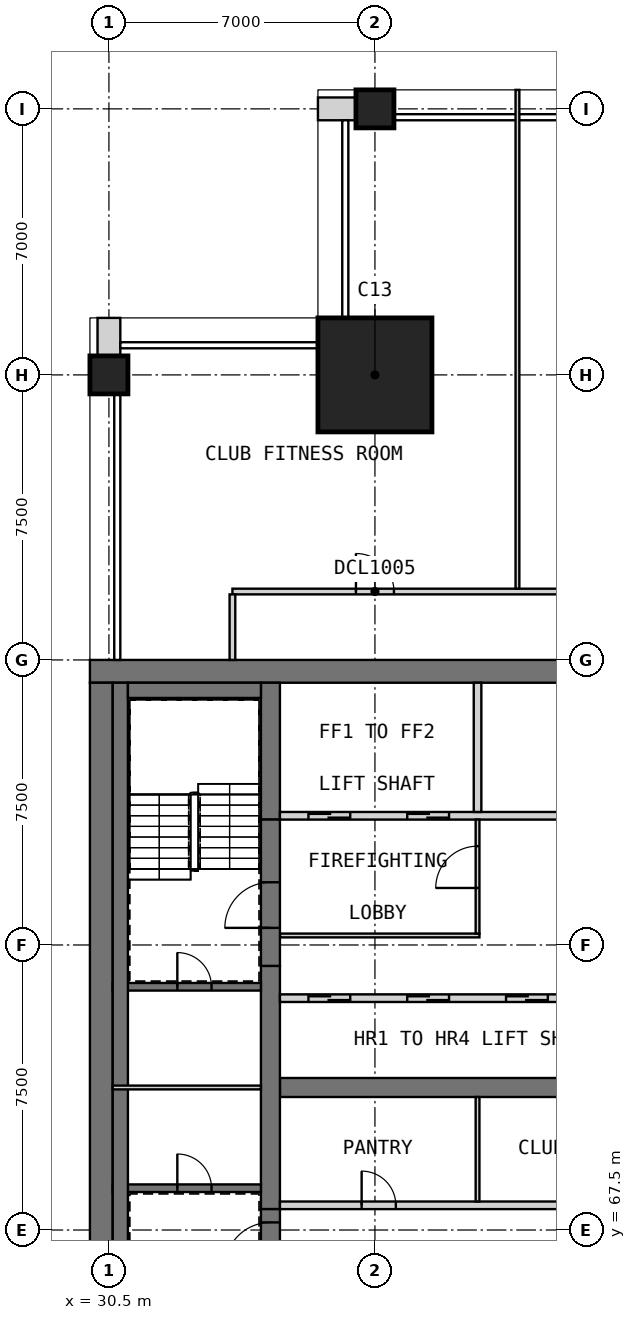
"""IFC4 building model, lengths in metres.
Left out: names, types, materials, properties, quantities, classifications, styles, units other than length and angle.
Written with IfcOpenShell. Run it as: python <this file> out.ifc"""

import sys

from ifc_helpers import new_model, si_unit, direction, frame, frame_2d, origin, origin_2d, place, context, subcontext, project, spatial, rectangle, extrude, element, fill, save


model = new_model("IFC4")
c1 = context("Model", 3, precision=1e-05, world=origin(), true_north=direction((0.0, 1.0)))
c2 = subcontext(c1, "Body", "Model", "MODEL_VIEW")
j1 = project(units=[si_unit("LENGTHUNIT", "METRE"), si_unit("PLANEANGLEUNIT", "RADIAN")], contexts=[c1])
p1 = place(None, origin())
s1 = spatial("IfcSite", under=j1, at=p1, CompositionType="ELEMENT")
p2 = place(p1, origin())
s2 = spatial("IfcBuilding", under=s1, at=p2, CompositionType="ELEMENT")
p3 = place(p2, frame((0.0, 0.0, 287.2)))
s3 = spatial("IfcBuildingStorey", under=s2, at=p3, CompositionType="ELEMENT", Elevation=287.2)
for number, where, z_axis, x_axis in (
    (1, (30.5, 90.0, 0.0), (0.0, 0.0, 1.0), (1.0, 0.0, 0.0)),
    (2, (37.5, 97.0, 0.0), (0.0, 0.0, 1.0), (1.0, 0.0, 0.0)),
):
    element("IfcColumn", number, at=place(p3, frame(where, z_axis=z_axis, x_axis=x_axis)), inside=s3, PredefinedType="COLUMN", context=c2, shape_type="SweptSolid", body=[
        extrude(rectangle(XDim=1.0, YDim=1.0, at=origin_2d()), origin(), (0.0, 0.0, 1.0), 5.0),
    ])
p4 = place(p3, frame((37.5, 90.0, 0.0), z_axis=(0.0, 0.0, 1.0), x_axis=(1.0, 0.0, 0.0)))
e3 = element("IfcColumn", 3, at=p4, inside=s3, PredefinedType="COLUMN", context=c2, shape_type="SweptSolid", body=[
    extrude(rectangle(XDim=3.0, YDim=3.0, at=origin_2d()), origin(), (0.0, 0.0, 1.0), 5.0),
])
p5 = place(p3, frame((30.0, 82.2, 0.0), z_axis=(0.0, 0.0, 1.0), x_axis=(1.0, 0.0, 0.0)))
e4 = element("IfcWall", 4, at=p5, inside=s3, PredefinedType="SHEAR", context=c2, shape_type="SweptSolid", body=[
    extrude(rectangle(XDim=30.0, YDim=0.6, at=frame_2d((15.0, 0.0))), origin(), (0.0, 0.0, 1.0), 5.0),
])
p6 = place(p3, frame((30.3, 60.6, 0.0), z_axis=(0.0, 0.0, 1.0), x_axis=(0.0, 1.0, 0.0)))
e5 = element("IfcWall", 5, at=p6, inside=s3, PredefinedType="SHEAR", context=c2, shape_type="SweptSolid", body=[
    extrude(rectangle(XDim=21.3, YDim=0.6, at=frame_2d((10.65, 0.0))), origin(), (0.0, 0.0, 1.0), 5.0),
])
p7 = place(p3, frame((35.0, 71.25, 0.0), z_axis=(0.0, 0.0, 1.0), x_axis=(1.0, 0.0, 0.0)))
e6 = element("IfcWall", 6, at=p7, inside=s3, PredefinedType="SHEAR", context=c2, shape_type="SweptSolid", body=[
    extrude(rectangle(XDim=15.6, YDim=0.5, at=frame_2d((7.8, 0.0))), origin(), (0.0, 0.0, 1.0), 5.0),
])
p8 = place(p3, frame((34.75, 68.05, 0.0), z_axis=(0.0, 0.0, 1.0), x_axis=(0.0, 1.0, 0.0)))
e7 = element("IfcWall", 7, at=p8, inside=s3, PredefinedType="SHEAR", context=c2, shape_type="SweptSolid", body=[
    extrude(rectangle(XDim=6.4, YDim=0.5, at=frame_2d((3.2, 0.0))), origin(), (0.0, 0.0, 1.0), 5.0),
])
p9 = place(p3, frame((34.75, 78.3, 0.0), z_axis=(0.0, 0.0, 1.0), x_axis=(0.0, 1.0, 0.0)))
e8 = element("IfcWall", 8, at=p9, inside=s3, PredefinedType="SHEAR", context=c2, shape_type="SweptSolid", body=[
    extrude(rectangle(XDim=3.6, YDim=0.5, at=frame_2d((1.8, 0.0))), origin(), (0.0, 0.0, 1.0), 5.0),
])
p10 = place(p2, frame((0.0, 0.0, 34.0)))
s4 = spatial("IfcBuildingStorey", under=s2, at=p10, CompositionType="ELEMENT", Elevation=34.0)
for number, where, z_axis, x_axis in (
    (9, (29.7, 70.8, 0.0), (0.0, 0.0, 1.0), (0.0, 1.0, 0.0)),
    (10, (29.7, 75.675, 0.0), (0.0, 0.0, 1.0), (0.0, 1.0, 0.0)),
    (11, (29.7, 80.55, 0.0), (0.0, 0.0, 1.0), (0.0, 1.0, 0.0)),
):
    element("IfcWall", number, at=place(p10, frame(where, z_axis=z_axis, x_axis=x_axis)), inside=s4, PredefinedType="SOLIDWALL", context=c2, shape_type="SweptSolid", body=[
        extrude(rectangle(XDim=0.9, YDim=0.6, at=frame_2d((0.45, 0.0))), origin(), (0.0, 0.0, 1.0), 286.2),
    ])
for number, where, z_axis, x_axis in (
    (12, (37.0, 97.0, 0.0), (0.0, 0.0, 1.0), (-1.0, 0.0, 0.0)),
    (13, (30.5, 91.5, 0.0), (0.0, 0.0, 1.0), (0.0, -1.0, 0.0)),
):
    element("IfcWall", number, at=place(p3, frame(where, z_axis=z_axis, x_axis=x_axis)), inside=s3, PredefinedType="SOLIDWALL", context=c2, shape_type="SweptSolid", body=[
        extrude(rectangle(XDim=1.0, YDim=0.6, at=frame_2d((0.5, 0.0))), origin(), (0.0, 0.0, 1.0), 4.7),
    ])
p11 = place(p3, frame((35.0, 68.15, 0.0), z_axis=(0.0, 0.0, 1.0), x_axis=(1.0, 0.0, 0.0)))
e14 = element("IfcWall", 14, at=p11, inside=s3, PredefinedType="PARTITIONING", context=c2, shape_type="SweptSolid", body=[
    extrude(rectangle(XDim=15.6, YDim=0.2, at=frame_2d((7.8, 0.0))), origin(), (0.0, 0.0, 1.0), 4.7),
])
p12 = place(p11, frame((2.15, 0.0, 0.0)))
e15 = element("IfcOpeningElement", 15, at=p12, cuts=e14, PredefinedType="OPENING", context=c2, shape_type="SweptSolid", body=[
    extrude(rectangle(XDim=0.9, YDim=2.1, at=frame_2d((0.45, 1.05))), frame((0.0, 0.11, 0.0), z_axis=(0.0, -1.0, 0.0), x_axis=(1.0, 0.0, 0.0)), (0.0, 0.0, 1.0), 0.22),
])
p13 = place(p11, frame((7.35, 0.0, 0.0)))
e16 = element("IfcOpeningElement", 16, at=p13, cuts=e14, PredefinedType="OPENING", context=c2, shape_type="SweptSolid", body=[
    extrude(rectangle(XDim=0.9, YDim=2.1, at=frame_2d((0.45, 1.05))), frame((0.0, 0.11, 0.0), z_axis=(0.0, -1.0, 0.0), x_axis=(1.0, 0.0, 0.0)), (0.0, 0.0, 1.0), 0.22),
])
p14 = place(p11, frame((12.55, 0.0, 0.0)))
e17 = element("IfcOpeningElement", 17, at=p14, cuts=e14, PredefinedType="OPENING", context=c2, shape_type="SweptSolid", body=[
    extrude(rectangle(XDim=0.9, YDim=2.1, at=frame_2d((0.45, 1.05))), frame((0.0, 0.11, 0.0), z_axis=(0.0, -1.0, 0.0), x_axis=(1.0, 0.0, 0.0)), (0.0, 0.0, 1.0), 0.22),
])
p15 = place(p3, frame((40.2, 68.25, 0.0), z_axis=(0.0, 0.0, 1.0), x_axis=(0.0, 1.0, 0.0)))
e18 = element("IfcWall", 18, at=p15, inside=s3, PredefinedType="PARTITIONING", context=c2, shape_type="SweptSolid", body=[
    extrude(rectangle(XDim=2.75, YDim=0.1, at=frame_2d((1.375, 0.0))), origin(), (0.0, 0.0, 1.0), 4.7),
])
p16 = place(p3, frame((35.0, 73.6, 0.0), z_axis=(0.0, 0.0, 1.0), x_axis=(1.0, 0.0, 0.0)))
e19 = element("IfcWall", 19, at=p16, inside=s3, PredefinedType="SOLIDWALL", context=c2, shape_type="SweptSolid", body=[
    extrude(rectangle(XDim=15.6, YDim=0.2, at=frame_2d((7.8, 0.0))), origin(), (0.0, 0.0, 1.0), 5.0),
])
p17 = place(p16, frame((0.75, 0.0, 0.0)))
e20 = element("IfcOpeningElement", 20, at=p17, cuts=e19, PredefinedType="OPENING", context=c2, shape_type="SweptSolid", body=[
    extrude(rectangle(XDim=1.1, YDim=2.1, at=frame_2d((0.55, 1.05))), frame((0.0, 0.11, 0.0), z_axis=(0.0, -1.0, 0.0), x_axis=(1.0, 0.0, 0.0)), (0.0, 0.0, 1.0), 0.22),
])
p18 = place(p16, frame((3.35, 0.0, 0.0)))
e21 = element("IfcOpeningElement", 21, at=p18, cuts=e19, PredefinedType="OPENING", context=c2, shape_type="SweptSolid", body=[
    extrude(rectangle(XDim=1.1, YDim=2.1, at=frame_2d((0.55, 1.05))), frame((0.0, 0.11, 0.0), z_axis=(0.0, -1.0, 0.0), x_axis=(1.0, 0.0, 0.0)), (0.0, 0.0, 1.0), 0.22),
])
p19 = place(p16, frame((5.95, 0.0, 0.0)))
e22 = element("IfcOpeningElement", 22, at=p19, cuts=e19, PredefinedType="OPENING", context=c2, shape_type="SweptSolid", body=[
    extrude(rectangle(XDim=1.1, YDim=2.1, at=frame_2d((0.55, 1.05))), frame((0.0, 0.11, 0.0), z_axis=(0.0, -1.0, 0.0), x_axis=(1.0, 0.0, 0.0)), (0.0, 0.0, 1.0), 0.22),
])
p20 = place(p16, frame((8.55, 0.0, 0.0)))
e23 = element("IfcOpeningElement", 23, at=p20, cuts=e19, PredefinedType="OPENING", context=c2, shape_type="SweptSolid", body=[
    extrude(rectangle(XDim=1.1, YDim=2.1, at=frame_2d((0.55, 1.05))), frame((0.0, 0.11, 0.0), z_axis=(0.0, -1.0, 0.0), x_axis=(1.0, 0.0, 0.0)), (0.0, 0.0, 1.0), 0.22),
])
p21 = place(p16, frame((11.15, 0.0, 0.0)))
e24 = element("IfcOpeningElement", 24, at=p21, cuts=e19, PredefinedType="OPENING", context=c2, shape_type="SweptSolid", body=[
    extrude(rectangle(XDim=1.1, YDim=2.1, at=frame_2d((0.55, 1.05))), frame((0.0, 0.11, 0.0), z_axis=(0.0, -1.0, 0.0), x_axis=(1.0, 0.0, 0.0)), (0.0, 0.0, 1.0), 0.22),
])
p22 = place(p16, frame((13.75, 0.0, 0.0)))
e25 = element("IfcOpeningElement", 25, at=p22, cuts=e19, PredefinedType="OPENING", context=c2, shape_type="SweptSolid", body=[
    extrude(rectangle(XDim=1.1, YDim=2.1, at=frame_2d((0.55, 1.05))), frame((0.0, 0.11, 0.0), z_axis=(0.0, -1.0, 0.0), x_axis=(1.0, 0.0, 0.0)), (0.0, 0.0, 1.0), 0.22),
])
p23 = place(p3, frame((35.0, 78.4, 0.0), z_axis=(0.0, 0.0, 1.0), x_axis=(1.0, 0.0, 0.0)))
e26 = element("IfcWall", 26, at=p23, inside=s3, PredefinedType="SOLIDWALL", context=c2, shape_type="SweptSolid", body=[
    extrude(rectangle(XDim=15.6, YDim=0.2, at=frame_2d((7.8, 0.0))), origin(), (0.0, 0.0, 1.0), 5.0),
])
p24 = place(p23, frame((0.75, 0.0, 0.0)))
e27 = element("IfcOpeningElement", 27, at=p24, cuts=e26, PredefinedType="OPENING", context=c2, shape_type="SweptSolid", body=[
    extrude(rectangle(XDim=1.1, YDim=2.1, at=frame_2d((0.55, 1.05))), frame((0.0, 0.11, 0.0), z_axis=(0.0, -1.0, 0.0), x_axis=(1.0, 0.0, 0.0)), (0.0, 0.0, 1.0), 0.22),
])
p25 = place(p23, frame((3.35, 0.0, 0.0)))
e28 = element("IfcOpeningElement", 28, at=p25, cuts=e26, PredefinedType="OPENING", context=c2, shape_type="SweptSolid", body=[
    extrude(rectangle(XDim=1.1, YDim=2.1, at=frame_2d((0.55, 1.05))), frame((0.0, 0.11, 0.0), z_axis=(0.0, -1.0, 0.0), x_axis=(1.0, 0.0, 0.0)), (0.0, 0.0, 1.0), 0.22),
])
p26 = place(p23, frame((11.15, 0.0, 0.0)))
e29 = element("IfcOpeningElement", 29, at=p26, cuts=e26, PredefinedType="OPENING", context=c2, shape_type="SweptSolid", body=[
    extrude(rectangle(XDim=1.1, YDim=2.1, at=frame_2d((0.55, 1.05))), frame((0.0, 0.11, 0.0), z_axis=(0.0, -1.0, 0.0), x_axis=(1.0, 0.0, 0.0)), (0.0, 0.0, 1.0), 0.22),
])
p27 = place(p23, frame((13.75, 0.0, 0.0)))
e30 = element("IfcOpeningElement", 30, at=p27, cuts=e26, PredefinedType="OPENING", context=c2, shape_type="SweptSolid", body=[
    extrude(rectangle(XDim=1.1, YDim=2.1, at=frame_2d((0.55, 1.05))), frame((0.0, 0.11, 0.0), z_axis=(0.0, -1.0, 0.0), x_axis=(1.0, 0.0, 0.0)), (0.0, 0.0, 1.0), 0.22),
])
p28 = place(p3, frame((40.2, 78.5, 0.0), z_axis=(0.0, 0.0, 1.0), x_axis=(0.0, 1.0, 0.0)))
e31 = element("IfcWall", 31, at=p28, inside=s3, PredefinedType="SOLIDWALL", context=c2, shape_type="SweptSolid", body=[
    extrude(rectangle(XDim=3.4, YDim=0.2, at=frame_2d((1.7, 0.0))), origin(), (0.0, 0.0, 1.0), 5.0),
])
p29 = place(p3, frame((35.0, 75.25, 0.0), z_axis=(0.0, 0.0, 1.0), x_axis=(1.0, 0.0, 0.0)))
e32 = element("IfcWall", 32, at=p29, inside=s3, PredefinedType="PARTITIONING", context=c2, shape_type="SweptSolid", body=[
    extrude(rectangle(XDim=5.25, YDim=0.1, at=frame_2d((2.625, 0.0))), origin(), (0.0, 0.0, 1.0), 4.7),
])
p30 = place(p3, frame((40.2, 75.3, 0.0), z_axis=(0.0, 0.0, 1.0), x_axis=(0.0, 1.0, 0.0)))
e33 = element("IfcWall", 33, at=p30, inside=s3, PredefinedType="PARTITIONING", context=c2, shape_type="SweptSolid", body=[
    extrude(rectangle(XDim=3.0, YDim=0.1, at=frame_2d((1.5, 0.0))), origin(), (0.0, 0.0, 1.0), 4.7),
])
p31 = place(p30, frame((1.2, 0.0, 0.0)))
e34 = element("IfcOpeningElement", 34, at=p31, cuts=e33, PredefinedType="OPENING", context=c2, shape_type="SweptSolid", body=[
    extrude(rectangle(XDim=1.1, YDim=2.1, at=frame_2d((0.55, 1.05))), frame((0.0, 0.06, 0.0), z_axis=(0.0, -1.0, 0.0), x_axis=(1.0, 0.0, 0.0)), (0.0, 0.0, 1.0), 0.12),
])
p32 = place(p3, frame((34.75, 64.2, 0.0), z_axis=(0.0, 0.0, 1.0), x_axis=(0.0, 1.0, 0.0)))
e35 = element("IfcWall", 35, at=p32, inside=s3, PredefinedType="SOLIDWALL", context=c2, shape_type="SweptSolid", body=[
    extrude(rectangle(XDim=3.85, YDim=0.5, at=frame_2d((1.925, 0.0))), origin(), (0.0, 0.0, 1.0), 3.8),
])
p33 = place(p32, frame((2.3, 0.0, 0.0)))
e36 = element("IfcOpeningElement", 36, at=p33, cuts=e35, PredefinedType="OPENING", context=c2, shape_type="SweptSolid", body=[
    extrude(rectangle(XDim=1.2, YDim=2.1, at=frame_2d((0.6, 1.05))), frame((0.0, 0.26, 0.0), z_axis=(0.0, -1.0, 0.0), x_axis=(1.0, 0.0, 0.0)), (0.0, 0.0, 1.0), 0.52),
])
p34 = place(p3, frame((34.75, 74.45, 0.0), z_axis=(0.0, 0.0, 1.0), x_axis=(0.0, 1.0, 0.0)))
e37 = element("IfcWall", 37, at=p34, inside=s3, PredefinedType="SOLIDWALL", context=c2, shape_type="SweptSolid", body=[
    extrude(rectangle(XDim=3.85, YDim=0.5, at=frame_2d((1.925, 0.0))), origin(), (0.0, 0.0, 1.0), 3.8),
])
p35 = place(p34, frame((1.0, 0.0, 0.0)))
e38 = element("IfcOpeningElement", 38, at=p35, cuts=e37, PredefinedType="OPENING", context=c2, shape_type="SweptSolid", body=[
    extrude(rectangle(XDim=1.2, YDim=2.1, at=frame_2d((0.6, 1.05))), frame((0.0, 0.26, 0.0), z_axis=(0.0, -1.0, 0.0), x_axis=(1.0, 0.0, 0.0)), (0.0, 0.0, 1.0), 0.52),
])
p36 = place(p3, frame((30.6, 68.6, 0.0), z_axis=(0.0, 0.0, 1.0), x_axis=(1.0, 0.0, 0.0)))
e39 = element("IfcWall", 39, at=p36, inside=s3, PredefinedType="SOLIDWALL", context=c2, shape_type="SweptSolid", body=[
    extrude(rectangle(XDim=3.9, YDim=0.2, at=frame_2d((1.95, 0.0))), origin(), (0.0, 0.0, 1.0), 4.7),
])
p37 = place(p36, frame((1.7, 0.0, 0.0)))
e40 = element("IfcOpeningElement", 40, at=p37, cuts=e39, PredefinedType="OPENING", context=c2, shape_type="SweptSolid", body=[
    extrude(rectangle(XDim=0.9, YDim=2.1, at=frame_2d((0.45, 1.05))), frame((0.0, 0.11, 0.0), z_axis=(0.0, -1.0, 0.0), x_axis=(1.0, 0.0, 0.0)), (0.0, 0.0, 1.0), 0.22),
])
p38 = place(p3, frame((30.6, 73.9, 0.0), z_axis=(0.0, 0.0, 1.0), x_axis=(1.0, 0.0, 0.0)))
e41 = element("IfcWall", 41, at=p38, inside=s3, PredefinedType="SOLIDWALL", context=c2, shape_type="SweptSolid", body=[
    extrude(rectangle(XDim=3.9, YDim=0.2, at=frame_2d((1.95, 0.0))), origin(), (0.0, 0.0, 1.0), 4.7),
])
p39 = place(p38, frame((1.7, 0.0, 0.0)))
e42 = element("IfcOpeningElement", 42, at=p39, cuts=e41, PredefinedType="OPENING", context=c2, shape_type="SweptSolid", body=[
    extrude(rectangle(XDim=0.9, YDim=2.1, at=frame_2d((0.45, 1.05))), frame((0.0, 0.11, 0.0), z_axis=(0.0, -1.0, 0.0), x_axis=(1.0, 0.0, 0.0)), (0.0, 0.0, 1.0), 0.22),
])
p40 = place(p3, frame((30.8, 60.6, 0.0), z_axis=(0.0, 0.0, 1.0), x_axis=(0.0, 1.0, 0.0)))
e43 = element("IfcWall", 43, at=p40, inside=s3, PredefinedType="SOLIDWALL", context=c2, shape_type="SweptSolid", body=[
    extrude(rectangle(XDim=21.3, YDim=0.4, at=frame_2d((10.65, 0.0))), origin(), (0.0, 0.0, 1.0), 4.7),
])
p41 = place(p3, frame((31.0, 81.7, 0.0), z_axis=(0.0, 0.0, 1.0), x_axis=(1.0, 0.0, 0.0)))
e44 = element("IfcWall", 44, at=p41, inside=s3, PredefinedType="SOLIDWALL", context=c2, shape_type="SweptSolid", body=[
    extrude(rectangle(XDim=3.5, YDim=0.4, at=frame_2d((1.75, 0.0))), origin(), (0.0, 0.0, 1.0), 4.7),
])
p42 = place(p3, frame((30.6, 71.25, 0.0), z_axis=(0.0, 0.0, 1.0), x_axis=(1.0, 0.0, 0.0)))
e45 = element("IfcWall", 45, at=p42, inside=s3, PredefinedType="PARTITIONING", context=c2, shape_type="SweptSolid", body=[
    extrude(rectangle(XDim=3.9, YDim=0.1, at=frame_2d((1.95, 0.0))), origin(), (0.0, 0.0, 1.0), 4.7),
])
p43 = place(p3, frame((33.75, 84.3, 0.0), z_axis=(0.0, 0.0, 1.0), x_axis=(1.0, 0.0, 0.0)))
e46 = element("IfcWall", 46, at=p43, inside=s3, PredefinedType="PARTITIONING", context=c2, shape_type="SweptSolid", body=[
    extrude(rectangle(XDim=28.05, YDim=0.15, at=frame_2d((14.025, 0.0))), origin(), (0.0, 0.0, 1.0), 4.7),
])
p44 = place(p43, frame((3.25, 0.0, 0.0)))
e47 = element("IfcOpeningElement", 47, at=p44, cuts=e46, PredefinedType="OPENING", context=c2, shape_type="SweptSolid", body=[
    extrude(rectangle(XDim=1.0, YDim=2.1, at=frame_2d((0.5, 1.05))), frame((0.0, 0.085, 0.0), z_axis=(0.0, -1.0, 0.0), x_axis=(1.0, 0.0, 0.0)), (0.0, 0.0, 1.0), 0.17),
])
p45 = place(p43, frame((10.75, 0.0, 0.0)))
e48 = element("IfcOpeningElement", 48, at=p45, cuts=e46, PredefinedType="OPENING", context=c2, shape_type="SweptSolid", body=[
    extrude(rectangle(XDim=1.0, YDim=2.1, at=frame_2d((0.5, 1.05))), frame((0.0, 0.085, 0.0), z_axis=(0.0, -1.0, 0.0), x_axis=(1.0, 0.0, 0.0)), (0.0, 0.0, 1.0), 0.17),
])
p46 = place(p43, frame((20.125, 0.0, 0.0)))
e49 = element("IfcOpeningElement", 49, at=p46, cuts=e46, PredefinedType="OPENING", context=c2, shape_type="SweptSolid", body=[
    extrude(rectangle(XDim=1.0, YDim=2.1, at=frame_2d((0.5, 1.05))), frame((0.0, 0.085, 0.0), z_axis=(0.0, -1.0, 0.0), x_axis=(1.0, 0.0, 0.0)), (0.0, 0.0, 1.0), 0.17),
])
p47 = place(p43, frame((26.65, 0.0, 0.0)))
e50 = element("IfcOpeningElement", 50, at=p47, cuts=e46, PredefinedType="OPENING", context=c2, shape_type="SweptSolid", body=[
    extrude(rectangle(XDim=1.0, YDim=2.1, at=frame_2d((0.5, 1.05))), frame((0.0, 0.085, 0.0), z_axis=(0.0, -1.0, 0.0), x_axis=(1.0, 0.0, 0.0)), (0.0, 0.0, 1.0), 0.17),
])
p48 = place(p3, frame((33.75, 82.5, 0.0), z_axis=(0.0, 0.0, 1.0), x_axis=(0.0, 1.0, 0.0)))
e51 = element("IfcWall", 51, at=p48, inside=s3, PredefinedType="PARTITIONING", context=c2, shape_type="SweptSolid", body=[
    extrude(rectangle(XDim=1.725, YDim=0.15, at=frame_2d((0.863, 0.0))), origin(), (0.0, 0.0, 1.0), 4.7),
])
p49 = place(p3, frame((41.25, 84.375, 0.0), z_axis=(0.0, 0.0, 1.0), x_axis=(0.0, 1.0, 0.0)))
e52 = element("IfcWall", 52, at=p49, inside=s3, PredefinedType="PARTITIONING", context=c2, shape_type="SweptSolid", body=[
    extrude(rectangle(XDim=13.125, YDim=0.1, at=frame_2d((6.562, 0.0))), origin(), (0.0, 0.0, 1.0), 4.7),
])
p50 = place(p12, origin())
e53 = element("IfcDoor", 53, at=p50, inside=s3, OperationType="SINGLE_SWING_RIGHT", PredefinedType="DOOR", context=c2, shape_type="SweptSolid", body=[
    extrude(rectangle(XDim=0.9, YDim=2.1, at=frame_2d((0.45, 1.05))), frame((0.0, 0.025, 0.0), z_axis=(0.0, -1.0, 0.0), x_axis=(1.0, 0.0, 0.0)), (0.0, 0.0, 1.0), 0.05),
])
fill(e15, e53)
p51 = place(p17, origin())
e54 = element("IfcDoor", 54, at=p51, inside=s3, OperationType="DOUBLE_DOOR_SLIDING", PredefinedType="DOOR", context=c2, shape_type="SweptSolid", body=[
    extrude(rectangle(XDim=1.1, YDim=2.1, at=frame_2d((0.55, 1.05))), frame((0.0, 0.025, 0.0), z_axis=(0.0, -1.0, 0.0), x_axis=(1.0, 0.0, 0.0)), (0.0, 0.0, 1.0), 0.05),
])
fill(e20, e54)
p52 = place(p18, origin())
e55 = element("IfcDoor", 55, at=p52, inside=s3, OperationType="DOUBLE_DOOR_SLIDING", PredefinedType="DOOR", context=c2, shape_type="SweptSolid", body=[
    extrude(rectangle(XDim=1.1, YDim=2.1, at=frame_2d((0.55, 1.05))), frame((0.0, 0.025, 0.0), z_axis=(0.0, -1.0, 0.0), x_axis=(1.0, 0.0, 0.0)), (0.0, 0.0, 1.0), 0.05),
])
fill(e21, e55)
p53 = place(p19, origin())
e56 = element("IfcDoor", 56, at=p53, inside=s3, OperationType="DOUBLE_DOOR_SLIDING", PredefinedType="DOOR", context=c2, shape_type="SweptSolid", body=[
    extrude(rectangle(XDim=1.1, YDim=2.1, at=frame_2d((0.55, 1.05))), frame((0.0, 0.025, 0.0), z_axis=(0.0, -1.0, 0.0), x_axis=(1.0, 0.0, 0.0)), (0.0, 0.0, 1.0), 0.05),
])
fill(e22, e56)
p54 = place(p24, origin())
e57 = element("IfcDoor", 57, at=p54, inside=s3, OperationType="DOUBLE_DOOR_SLIDING", PredefinedType="DOOR", context=c2, shape_type="SweptSolid", body=[
    extrude(rectangle(XDim=1.1, YDim=2.1, at=frame_2d((0.55, 1.05))), frame((0.0, 0.025, 0.0), z_axis=(0.0, -1.0, 0.0), x_axis=(1.0, 0.0, 0.0)), (0.0, 0.0, 1.0), 0.05),
])
fill(e27, e57)
p55 = place(p25, origin())
e58 = element("IfcDoor", 58, at=p55, inside=s3, OperationType="DOUBLE_DOOR_SLIDING", PredefinedType="DOOR", context=c2, shape_type="SweptSolid", body=[
    extrude(rectangle(XDim=1.1, YDim=2.1, at=frame_2d((0.55, 1.05))), frame((0.0, 0.025, 0.0), z_axis=(0.0, -1.0, 0.0), x_axis=(1.0, 0.0, 0.0)), (0.0, 0.0, 1.0), 0.05),
])
fill(e28, e58)
p56 = place(p31, origin())
e59 = element("IfcDoor", 59, at=p56, inside=s3, OperationType="SINGLE_SWING_LEFT", PredefinedType="DOOR", context=c2, shape_type="SweptSolid", body=[
    extrude(rectangle(XDim=1.1, YDim=2.1, at=frame_2d((0.55, 1.05))), frame((0.0, 0.025, 0.0), z_axis=(0.0, -1.0, 0.0), x_axis=(1.0, 0.0, 0.0)), (0.0, 0.0, 1.0), 0.05),
])
fill(e34, e59)
p57 = place(p33, origin())
e60 = element("IfcDoor", 60, at=p57, inside=s3, OperationType="SINGLE_SWING_LEFT", PredefinedType="DOOR", context=c2, shape_type="SweptSolid", body=[
    extrude(rectangle(XDim=1.2, YDim=2.1, at=frame_2d((0.6, 1.05))), frame((0.0, 0.025, 0.0), z_axis=(0.0, -1.0, 0.0), x_axis=(1.0, 0.0, 0.0)), (0.0, 0.0, 1.0), 0.05),
])
fill(e36, e60)
p58 = place(p35, origin())
e61 = element("IfcDoor", 61, at=p58, inside=s3, OperationType="SINGLE_SWING_RIGHT", PredefinedType="DOOR", context=c2, shape_type="SweptSolid", body=[
    extrude(rectangle(XDim=1.2, YDim=2.1, at=frame_2d((0.6, 1.05))), frame((0.0, 0.025, 0.0), z_axis=(0.0, -1.0, 0.0), x_axis=(1.0, 0.0, 0.0)), (0.0, 0.0, 1.0), 0.05),
])
fill(e38, e61)
p59 = place(p37, origin())
e62 = element("IfcDoor", 62, at=p59, inside=s3, OperationType="SINGLE_SWING_LEFT", PredefinedType="DOOR", context=c2, shape_type="SweptSolid", body=[
    extrude(rectangle(XDim=0.9, YDim=2.1, at=frame_2d((0.45, 1.05))), frame((0.0, 0.025, 0.0), z_axis=(0.0, -1.0, 0.0), x_axis=(1.0, 0.0, 0.0)), (0.0, 0.0, 1.0), 0.05),
])
fill(e40, e62)
p60 = place(p39, origin())
e63 = element("IfcDoor", 63, at=p60, inside=s3, OperationType="SINGLE_SWING_RIGHT", PredefinedType="DOOR", context=c2, shape_type="SweptSolid", body=[
    extrude(rectangle(XDim=0.9, YDim=2.1, at=frame_2d((0.45, 1.05))), frame((0.0, 0.025, 0.0), z_axis=(0.0, -1.0, 0.0), x_axis=(1.0, 0.0, 0.0)), (0.0, 0.0, 1.0), 0.05),
])
fill(e42, e63)
p61 = place(p44, origin())
e64 = element("IfcDoor", 64, at=p61, inside=s3, OperationType="SINGLE_SWING_LEFT", PredefinedType="DOOR", context=c2, shape_type="SweptSolid", body=[
    extrude(rectangle(XDim=1.0, YDim=2.1, at=frame_2d((0.5, 1.05))), frame((0.0, 0.025, 0.0), z_axis=(0.0, -1.0, 0.0), x_axis=(1.0, 0.0, 0.0)), (0.0, 0.0, 1.0), 0.05),
])
fill(e47, e64)
save(model, sys.argv[1])
